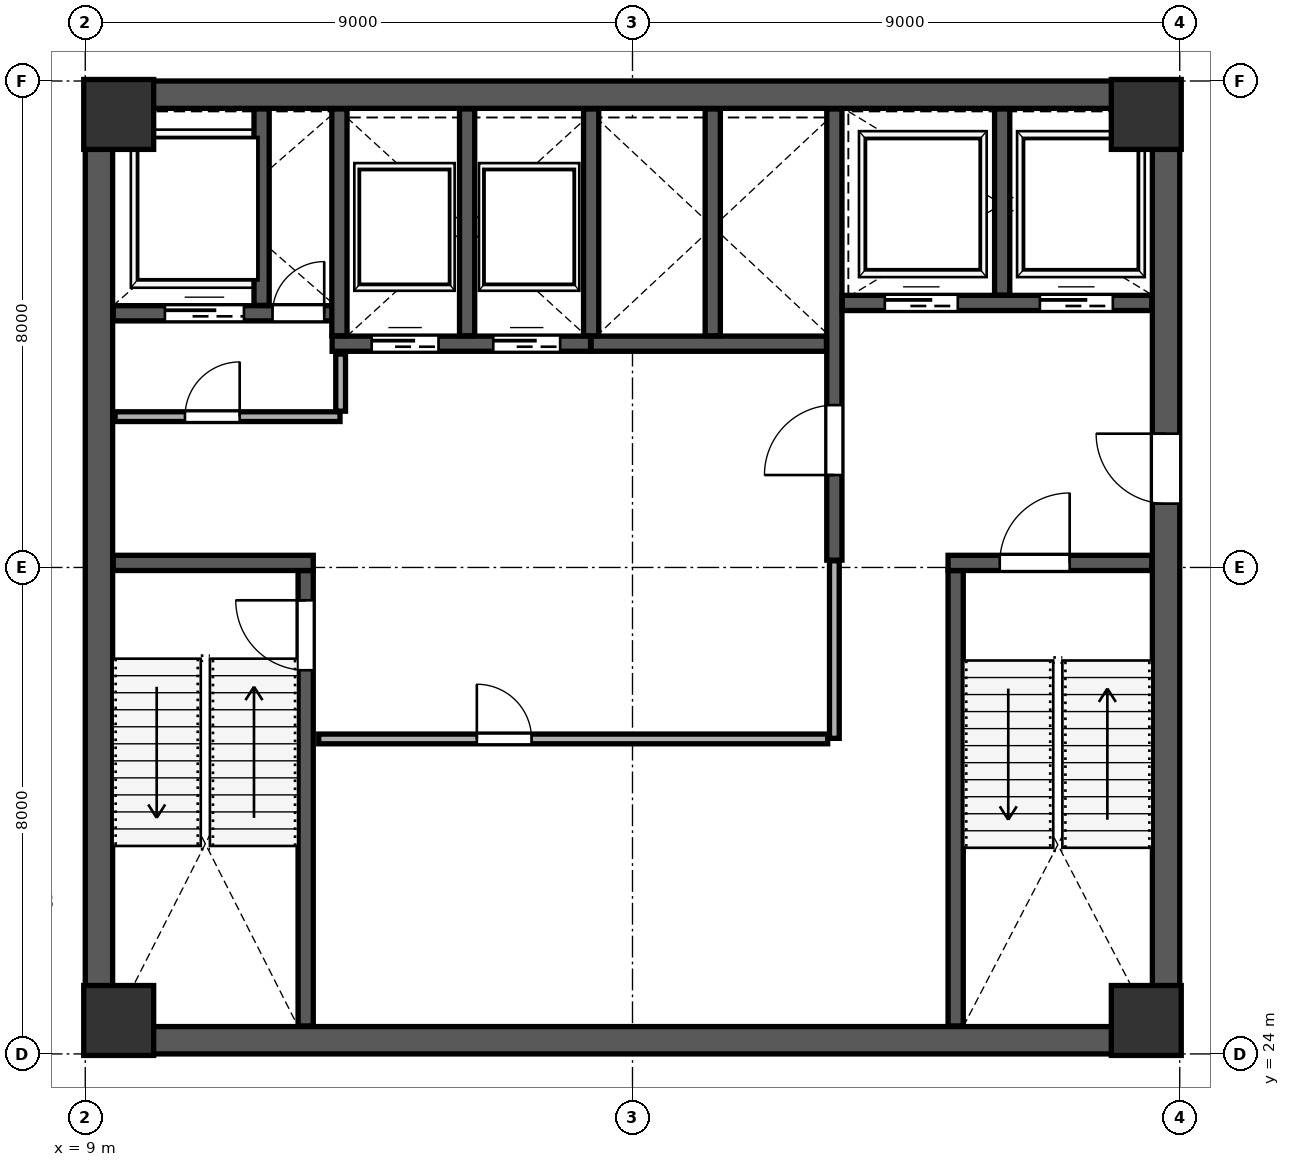
"""IFC4 building model, lengths in metres.
Left out: names, types, materials, properties, quantities, classifications, styles, units other than length and angle.
Written with IfcOpenShell. Run it as: python <this file> out.ifc"""

import sys

from ifc_helpers import new_model, si_unit, direction, frame, frame_2d, origin, origin_2d, place, context, subcontext, project, spatial, rectangle, extrude, source, transform, mapped, element, fill, save


model = new_model("IFC4")
c1 = context("Model", 3, precision=1e-05, world=origin(), true_north=direction((0.0, 1.0)))
c2 = subcontext(c1, "Body", "Model", "MODEL_VIEW")
j1 = project(units=[si_unit("LENGTHUNIT", "METRE"), si_unit("PLANEANGLEUNIT", "RADIAN")], contexts=[c1])
p1 = place(None, origin())
s1 = spatial("IfcSite", under=j1, at=p1, CompositionType="ELEMENT")
p2 = place(p1, origin())
s2 = spatial("IfcBuilding", under=s1, at=p2, CompositionType="ELEMENT")
p3 = place(p2, frame((0.0, 0.0, 196.0)))
s3 = spatial("IfcBuildingStorey", under=s2, at=p3, CompositionType="ELEMENT", Elevation=196.0)
m1 = source(origin(), c2, "Body", "SweptSolid", [
    extrude(rectangle(XDim=1.15, YDim=1.15, at=origin_2d()), origin(), (0.0, 0.0, 1.0), 4.198),
])
for number, where, z_axis, x_axis in (
    (1, (9.55, 24.55, 0.001), (0.0, 0.0, 1.0), (1.0, 0.0, 0.0)),
    (2, (26.45, 24.55, 0.001), (0.0, 0.0, 1.0), (1.0, 0.0, 0.0)),
    (3, (9.55, 39.45, 0.001), (0.0, 0.0, 1.0), (1.0, 0.0, 0.0)),
    (4, (26.45, 39.45, 0.001), (0.0, 0.0, 1.0), (1.0, 0.0, 0.0)),
):
    element("IfcColumn", number, at=place(p3, frame(where, z_axis=z_axis, x_axis=x_axis)), inside=s3, PredefinedType="COLUMN", context=c2, shape_type="MappedRepresentation", body=[
        mapped(m1, transform((0.0, 0.0, 0.0), scale=1.0)),
    ])
p4 = place(p3, frame((9.225, 24.45, 0.0), z_axis=(0.0, 0.0, 1.0), x_axis=(0.0, 1.0, 0.0)))
e5 = element("IfcWall", 5, at=p4, inside=s3, PredefinedType="SHEAR", context=c2, shape_type="SweptSolid", body=[
    extrude(rectangle(XDim=15.1, YDim=0.45, at=frame_2d((7.55, 0.0))), origin(), (0.0, 0.0, 1.0), 3.96),
])
p5 = place(p3, frame((26.775, 24.45, 0.0), z_axis=(0.0, 0.0, 1.0), x_axis=(0.0, 1.0, 0.0)))
e6 = element("IfcWall", 6, at=p5, inside=s3, PredefinedType="SHEAR", context=c2, shape_type="SweptSolid", body=[
    extrude(rectangle(XDim=15.1, YDim=0.45, at=frame_2d((7.55, 0.0))), origin(), (0.0, 0.0, 1.0), 3.96),
])
p6 = place(p5, frame((8.6, 0.0, 0.0)))
e7 = element("IfcOpeningElement", 7, at=p6, cuts=e6, PredefinedType="OPENING", context=c2, shape_type="SweptSolid", body=[
    extrude(rectangle(XDim=1.15, YDim=2.2, at=frame_2d((0.575, 1.1))), frame((0.0, 0.235, 0.0), z_axis=(0.0, -1.0, 0.0), x_axis=(1.0, 0.0, 0.0)), (0.0, 0.0, 1.0), 0.47),
])
for number, where, z_axis, x_axis in (
    (8, (9.0, 24.225, 0.0), (0.0, 0.0, 1.0), (1.0, 0.0, 0.0)),
    (9, (9.0, 39.775, 0.0), (0.0, 0.0, 1.0), (1.0, 0.0, 0.0)),
):
    element("IfcWall", number, at=place(p3, frame(where, z_axis=z_axis, x_axis=x_axis)), inside=s3, PredefinedType="SHEAR", context=c2, shape_type="SweptSolid", body=[
        extrude(rectangle(XDim=18.0, YDim=0.45, at=frame_2d((9.0, 0.0))), origin(), (0.0, 0.0, 1.0), 3.96),
    ])
p7 = place(p3, frame((12.625, 24.46, 0.0), z_axis=(0.0, 0.0, 1.0), x_axis=(0.0, 1.0, 0.0)))
e10 = element("IfcWall", 10, at=p7, inside=s3, PredefinedType="SHEAR", context=c2, shape_type="SweptSolid", body=[
    extrude(rectangle(XDim=7.49, YDim=0.25, at=frame_2d((3.745, 0.0))), origin(), (0.0, 0.0, 1.0), 3.96),
])
p8 = place(p7, frame((5.85, 0.0, 0.0)))
e11 = element("IfcOpeningElement", 11, at=p8, cuts=e10, PredefinedType="OPENING", context=c2, shape_type="SweptSolid", body=[
    extrude(rectangle(XDim=1.15, YDim=2.2, at=frame_2d((0.575, 1.1))), frame((0.0, 0.135, 0.0), z_axis=(0.0, -1.0, 0.0), x_axis=(1.0, 0.0, 0.0)), (0.0, 0.0, 1.0), 0.27),
])
p9 = place(p3, frame((9.46, 32.075, 0.0), z_axis=(0.0, 0.0, 1.0), x_axis=(1.0, 0.0, 0.0)))
e12 = element("IfcWall", 12, at=p9, inside=s3, PredefinedType="SHEAR", context=c2, shape_type="SweptSolid", body=[
    extrude(rectangle(XDim=3.29, YDim=0.25, at=frame_2d((1.645, 0.0))), origin(), (0.0, 0.0, 1.0), 3.96),
])
p10 = place(p3, frame((23.315, 24.46, 0.0), z_axis=(0.0, 0.0, 1.0), x_axis=(0.0, 1.0, 0.0)))
e13 = element("IfcWall", 13, at=p10, inside=s3, PredefinedType="SHEAR", context=c2, shape_type="SweptSolid", body=[
    extrude(rectangle(XDim=7.49, YDim=0.25, at=frame_2d((3.745, 0.0))), origin(), (0.0, 0.0, 1.0), 3.96),
])
p11 = place(p3, frame((23.19, 32.075, 0.0), z_axis=(0.0, 0.0, 1.0), x_axis=(1.0, 0.0, 0.0)))
e14 = element("IfcWall", 14, at=p11, inside=s3, PredefinedType="SHEAR", context=c2, shape_type="SweptSolid", body=[
    extrude(rectangle(XDim=3.35, YDim=0.25, at=frame_2d((1.675, 0.0))), origin(), (0.0, 0.0, 1.0), 3.96),
])
p12 = place(p11, frame((0.85, 0.0, 0.0)))
e15 = element("IfcOpeningElement", 15, at=p12, cuts=e14, PredefinedType="OPENING", context=c2, shape_type="SweptSolid", body=[
    extrude(rectangle(XDim=1.15, YDim=2.2, at=frame_2d((0.575, 1.1))), frame((0.0, 0.135, 0.0), z_axis=(0.0, -1.0, 0.0), x_axis=(1.0, 0.0, 0.0)), (0.0, 0.0, 1.0), 0.27),
])
p13 = place(p3, frame((21.32, 32.12, 0.0), z_axis=(0.0, 0.0, 1.0), x_axis=(0.0, 1.0, 0.0)))
e16 = element("IfcWall", 16, at=p13, inside=s3, PredefinedType="SHEAR", context=c2, shape_type="SweptSolid", body=[
    extrude(rectangle(XDim=7.42, YDim=0.25, at=frame_2d((3.71, 0.0))), origin(), (0.0, 0.0, 1.0), 3.96),
])
p14 = place(p13, frame((1.4, 0.0, 0.0)))
e17 = element("IfcOpeningElement", 17, at=p14, cuts=e16, PredefinedType="OPENING", context=c2, shape_type="SweptSolid", body=[
    extrude(rectangle(XDim=1.15, YDim=2.2, at=frame_2d((0.575, 1.1))), frame((0.0, 0.135, 0.0), z_axis=(0.0, -1.0, 0.0), x_axis=(1.0, 0.0, 0.0)), (0.0, 0.0, 1.0), 0.27),
])
p15 = place(p3, frame((9.46, 36.18, 0.0), z_axis=(0.0, 0.0, 1.0), x_axis=(1.0, 0.0, 0.0)))
e18 = element("IfcWall", 18, at=p15, inside=s3, PredefinedType="SHEAR", context=c2, shape_type="SweptSolid", body=[
    extrude(rectangle(XDim=3.79, YDim=0.25, at=frame_2d((1.895, 0.0))), origin(), (0.0, 0.0, 1.0), 3.96),
])
p16 = place(p15, frame((2.62, 0.0, 0.0)))
e19 = element("IfcOpeningElement", 19, at=p16, cuts=e18, PredefinedType="OPENING", context=c2, shape_type="SweptSolid", body=[
    extrude(rectangle(XDim=0.85, YDim=2.1, at=frame_2d((0.425, 1.05))), frame((0.0, 0.135, 0.0), z_axis=(0.0, -1.0, 0.0), x_axis=(1.0, 0.0, 0.0)), (0.0, 0.0, 1.0), 0.27),
])
p17 = place(p15, frame((0.85, 0.0, 0.0)))
e20 = element("IfcOpeningElement", 20, at=p17, cuts=e18, PredefinedType="OPENING", context=c2, shape_type="SweptSolid", body=[
    extrude(rectangle(XDim=1.3, YDim=2.25, at=frame_2d((0.65, 1.125))), frame((0.0, 0.135, 0.0), z_axis=(0.0, -1.0, 0.0), x_axis=(1.0, 0.0, 0.0)), (0.0, 0.0, 1.0), 0.27),
])
p18 = place(p3, frame((11.9, 36.31, 0.0), z_axis=(0.0, 0.0, 1.0), x_axis=(0.0, 1.0, 0.0)))
e21 = element("IfcWall", 21, at=p18, inside=s3, PredefinedType="SHEAR", context=c2, shape_type="SweptSolid", body=[
    extrude(rectangle(XDim=3.23, YDim=0.25, at=frame_2d((1.615, 0.0))), origin(), (0.0, 0.0, 1.0), 3.96),
])
p19 = place(p3, frame((21.45, 36.35, 0.0), z_axis=(0.0, 0.0, 1.0), x_axis=(1.0, 0.0, 0.0)))
e22 = element("IfcWall", 22, at=p19, inside=s3, PredefinedType="SHEAR", context=c2, shape_type="SweptSolid", body=[
    extrude(rectangle(XDim=5.09, YDim=0.25, at=frame_2d((2.545, 0.0))), origin(), (0.0, 0.0, 1.0), 3.96),
])
p20 = place(p19, frame((0.7, 0.0, 0.0)))
e23 = element("IfcOpeningElement", 23, at=p20, cuts=e22, PredefinedType="OPENING", context=c2, shape_type="SweptSolid", body=[
    extrude(rectangle(XDim=1.2, YDim=2.2, at=frame_2d((0.6, 1.1))), frame((0.0, 0.135, 0.0), z_axis=(0.0, -1.0, 0.0), x_axis=(1.0, 0.0, 0.0)), (0.0, 0.0, 1.0), 0.27),
])
p21 = place(p19, frame((3.25, 0.0, 0.0)))
e24 = element("IfcOpeningElement", 24, at=p21, cuts=e22, PredefinedType="OPENING", context=c2, shape_type="SweptSolid", body=[
    extrude(rectangle(XDim=1.2, YDim=2.2, at=frame_2d((0.6, 1.1))), frame((0.0, 0.135, 0.0), z_axis=(0.0, -1.0, 0.0), x_axis=(1.0, 0.0, 0.0)), (0.0, 0.0, 1.0), 0.27),
])
p22 = place(p3, frame((24.08, 36.48, 0.0), z_axis=(0.0, 0.0, 1.0), x_axis=(0.0, 1.0, 0.0)))
e25 = element("IfcWall", 25, at=p22, inside=s3, PredefinedType="SHEAR", context=c2, shape_type="SweptSolid", body=[
    extrude(rectangle(XDim=3.06, YDim=0.25, at=frame_2d((1.53, 0.0))), origin(), (0.0, 0.0, 1.0), 3.96),
])
p23 = place(p3, frame((13.06, 35.68, 0.0), z_axis=(0.0, 0.0, 1.0), x_axis=(1.0, 0.0, 0.0)))
e26 = element("IfcWall", 26, at=p23, inside=s3, PredefinedType="SHEAR", context=c2, shape_type="SweptSolid", body=[
    extrude(rectangle(XDim=4.25, YDim=0.25, at=frame_2d((2.125, 0.0))), origin(), (0.0, 0.0, 1.0), 3.96),
])
p24 = place(p23, frame((0.65, 0.0, 0.0)))
e27 = element("IfcOpeningElement", 27, at=p24, cuts=e26, PredefinedType="OPENING", context=c2, shape_type="SweptSolid", body=[
    extrude(rectangle(XDim=1.1, YDim=2.2, at=frame_2d((0.55, 1.1))), frame((0.0, 0.135, 0.0), z_axis=(0.0, -1.0, 0.0), x_axis=(1.0, 0.0, 0.0)), (0.0, 0.0, 1.0), 0.27),
])
p25 = place(p23, frame((2.65, 0.0, 0.0)))
e28 = element("IfcOpeningElement", 28, at=p25, cuts=e26, PredefinedType="OPENING", context=c2, shape_type="SweptSolid", body=[
    extrude(rectangle(XDim=1.1, YDim=2.2, at=frame_2d((0.55, 1.1))), frame((0.0, 0.135, 0.0), z_axis=(0.0, -1.0, 0.0), x_axis=(1.0, 0.0, 0.0)), (0.0, 0.0, 1.0), 0.27),
])
for number, where, z_axis, x_axis in (
    (29, (13.18, 35.81, 0.0), (0.0, 0.0, 1.0), (0.0, 1.0, 0.0)),
    (30, (15.28, 35.81, 0.0), (0.0, 0.0, 1.0), (0.0, 1.0, 0.0)),
):
    element("IfcWall", number, at=place(p3, frame(where, z_axis=z_axis, x_axis=x_axis)), inside=s3, PredefinedType="SHEAR", context=c2, shape_type="SweptSolid", body=[
        extrude(rectangle(XDim=3.73, YDim=0.25, at=frame_2d((1.865, 0.0))), origin(), (0.0, 0.0, 1.0), 3.96),
    ])
p26 = place(p3, frame((17.32, 35.68, 0.0), z_axis=(0.0, 0.0, 1.0), x_axis=(1.0, 0.0, 0.0)))
e31 = element("IfcWall", 31, at=p26, inside=s3, PredefinedType="SHEAR", context=c2, shape_type="SweptSolid", body=[
    extrude(rectangle(XDim=3.87, YDim=0.25, at=frame_2d((1.935, 0.0))), origin(), (0.0, 0.0, 1.0), 3.96),
])
for number, where, z_axis, x_axis in (
    (32, (17.32, 35.81, 0.0), (0.0, 0.0, 1.0), (0.0, 1.0, 0.0)),
    (33, (19.32, 35.81, 0.0), (0.0, 0.0, 1.0), (0.0, 1.0, 0.0)),
):
    element("IfcWall", number, at=place(p3, frame(where, z_axis=z_axis, x_axis=x_axis)), inside=s3, PredefinedType="SHEAR", context=c2, shape_type="SweptSolid", body=[
        extrude(rectangle(XDim=3.73, YDim=0.25, at=frame_2d((1.865, 0.0))), origin(), (0.0, 0.0, 1.0), 3.96),
    ])
p27 = place(p3, frame((9.49, 34.48, 0.0), z_axis=(0.0, 0.0, 1.0), x_axis=(1.0, 0.0, 0.0)))
e34 = element("IfcWall", 34, at=p27, inside=s3, PredefinedType="PARTITIONING", context=c2, shape_type="SweptSolid", body=[
    extrude(rectangle(XDim=3.7, YDim=0.16, at=frame_2d((1.85, 0.0))), origin(), (0.0, 0.0, 1.0), 3.96),
])
p28 = place(p27, frame((1.15, 0.0, 0.0)))
e35 = element("IfcOpeningElement", 35, at=p28, cuts=e34, PredefinedType="OPENING", context=c2, shape_type="SweptSolid", body=[
    extrude(rectangle(XDim=0.9, YDim=2.15, at=frame_2d((0.45, 1.075))), frame((0.0, 0.09, 0.0), z_axis=(0.0, -1.0, 0.0), x_axis=(1.0, 0.0, 0.0)), (0.0, 0.0, 1.0), 0.18),
])
p29 = place(p3, frame((13.2, 34.57, 0.0), z_axis=(0.0, 0.0, 1.0), x_axis=(0.0, 1.0, 0.0)))
e36 = element("IfcWall", 36, at=p29, inside=s3, PredefinedType="PARTITIONING", context=c2, shape_type="SweptSolid", body=[
    extrude(rectangle(XDim=0.94, YDim=0.16, at=frame_2d((0.47, 0.0))), origin(), (0.0, 0.0, 1.0), 3.96),
])
p30 = place(p3, frame((12.84, 29.18, 0.0), z_axis=(0.0, 0.0, 1.0), x_axis=(1.0, 0.0, 0.0)))
e37 = element("IfcWall", 37, at=p30, inside=s3, PredefinedType="PARTITIONING", context=c2, shape_type="SweptSolid", body=[
    extrude(rectangle(XDim=8.37, YDim=0.16, at=frame_2d((4.185, 0.0))), origin(), (0.0, 0.0, 1.0), 3.96),
])
p31 = place(p30, frame((2.6, 0.0, 0.0)))
e38 = element("IfcOpeningElement", 38, at=p31, cuts=e37, PredefinedType="OPENING", context=c2, shape_type="SweptSolid", body=[
    extrude(rectangle(XDim=0.9, YDim=2.15, at=frame_2d((0.45, 1.075))), frame((0.0, 0.09, 0.0), z_axis=(0.0, -1.0, 0.0), x_axis=(1.0, 0.0, 0.0)), (0.0, 0.0, 1.0), 0.18),
])
p32 = place(p3, frame((21.32, 29.19, 0.0), z_axis=(0.0, 0.0, 1.0), x_axis=(0.0, 1.0, 0.0)))
e39 = element("IfcWall", 39, at=p32, inside=s3, PredefinedType="PARTITIONING", context=c2, shape_type="SweptSolid", body=[
    extrude(rectangle(XDim=2.92, YDim=0.16, at=frame_2d((1.46, 0.0))), origin(), (0.0, 0.0, 1.0), 3.96),
])
p33 = place(p3, frame((14.821, 50.374, 0.0), z_axis=(0.0, 0.0, 1.0), x_axis=(0.819153719849, -0.573574043396, 0.0)))
e40 = element("IfcWall", 40, at=p33, inside=s3, PredefinedType="PARTITIONING", context=c2, shape_type="SweptSolid", body=[
    extrude(rectangle(XDim=26.99, YDim=0.115, at=frame_2d((13.495, 0.0))), origin(), (0.0, 0.0, 1.0), 3.96),
])
p34 = place(p33, frame((18.8, 0.0, 0.0)))
e41 = element("IfcOpeningElement", 41, at=p34, cuts=e40, PredefinedType="OPENING", context=c2, shape_type="SweptSolid", body=[
    extrude(rectangle(XDim=0.95, YDim=2.15, at=frame_2d((0.475, 1.075))), frame((0.0, 0.067, 0.0), z_axis=(0.0, -1.0, 0.0), x_axis=(1.0, 0.0, 0.0)), (0.0, 0.0, 1.0), 0.135),
])
p35 = place(p3, frame((1.189, 30.975, 0.0), z_axis=(0.0, 0.0, 1.0), x_axis=(0.573571020786, 0.819155836282, 0.0)))
e42 = element("IfcWall", 42, at=p35, inside=s3, PredefinedType="PARTITIONING", context=c2, shape_type="SweptSolid", body=[
    extrude(rectangle(XDim=23.67, YDim=0.135, at=frame_2d((11.835, 0.0))), origin(), (0.0, 0.0, 1.0), 3.96),
])
p36 = place(p35, frame((6.6, 0.0, 0.0)))
e43 = element("IfcOpeningElement", 43, at=p36, cuts=e42, PredefinedType="OPENING", context=c2, shape_type="SweptSolid", body=[
    extrude(rectangle(XDim=0.95, YDim=2.15, at=frame_2d((0.475, 1.075))), frame((0.0, 0.078, 0.0), z_axis=(0.0, -1.0, 0.0), x_axis=(1.0, 0.0, 0.0)), (0.0, 0.0, 1.0), 0.155),
])
m2 = source(origin(), c2, "Body", "SweptSolid", [
    extrude(rectangle(XDim=1.15, YDim=2.2, at=frame_2d((0.575, 1.1))), frame((0.0, 0.025, 0.0), z_axis=(0.0, -1.0, 0.0), x_axis=(1.0, 0.0, 0.0)), (0.0, 0.0, 1.0), 0.05),
])
p37 = place(p8, origin())
e44 = element("IfcDoor", 44, at=p37, inside=s3, OperationType="SINGLE_SWING_RIGHT", PredefinedType="DOOR", context=c2, shape_type="MappedRepresentation", body=[
    mapped(m2, transform((0.0, 0.0, 0.0), scale=1.0)),
])
fill(e11, e44)
m3 = source(origin(), c2, "Body", "SweptSolid", [
    extrude(rectangle(XDim=1.15, YDim=2.2, at=frame_2d((0.575, 1.1))), frame((0.0, 0.025, 0.0), z_axis=(0.0, -1.0, 0.0), x_axis=(1.0, 0.0, 0.0)), (0.0, 0.0, 1.0), 0.05),
])
p38 = place(p14, origin())
e45 = element("IfcDoor", 45, at=p38, inside=s3, OperationType="SINGLE_SWING_LEFT", PredefinedType="DOOR", context=c2, shape_type="MappedRepresentation", body=[
    mapped(m3, transform((0.0, 0.0, 0.0), scale=1.0)),
])
fill(e17, e45)
p39 = place(p12, origin())
e46 = element("IfcDoor", 46, at=p39, inside=s3, OperationType="SINGLE_SWING_RIGHT", PredefinedType="DOOR", context=c2, shape_type="MappedRepresentation", body=[
    mapped(m2, transform((0.0, 0.0, 0.0), scale=1.0)),
])
fill(e15, e46)
p40 = place(p6, origin())
e47 = element("IfcDoor", 47, at=p40, inside=s3, OperationType="SINGLE_SWING_RIGHT", PredefinedType="DOOR", context=c2, shape_type="MappedRepresentation", body=[
    mapped(m3, transform((0.0, 0.0, 0.0), scale=1.0)),
])
fill(e7, e47)
m4 = source(origin(), c2, "Body", "SweptSolid", [
    extrude(rectangle(XDim=0.85, YDim=2.1, at=frame_2d((0.425, 1.05))), frame((0.0, 0.025, 0.0), z_axis=(0.0, -1.0, 0.0), x_axis=(1.0, 0.0, 0.0)), (0.0, 0.0, 1.0), 0.05),
])
p41 = place(p16, origin())
e48 = element("IfcDoor", 48, at=p41, inside=s3, OperationType="SINGLE_SWING_RIGHT", PredefinedType="DOOR", context=c2, shape_type="MappedRepresentation", body=[
    mapped(m4, transform((0.0, 0.0, 0.0), scale=1.0)),
])
fill(e19, e48)
m5 = source(origin(), c2, "Body", "SweptSolid", [
    extrude(rectangle(XDim=1.1, YDim=2.2, at=frame_2d((0.55, 1.1))), frame((0.0, 0.025, 0.0), z_axis=(0.0, -1.0, 0.0), x_axis=(1.0, 0.0, 0.0)), (0.0, 0.0, 1.0), 0.05),
])
p42 = place(p24, origin())
e49 = element("IfcDoor", 49, at=p42, inside=s3, OperationType="SLIDING_TO_LEFT", PredefinedType="DOOR", context=c2, shape_type="MappedRepresentation", body=[
    mapped(m5, transform((0.0, 0.0, 0.0), scale=1.0)),
])
fill(e27, e49)
p43 = place(p25, origin())
e50 = element("IfcDoor", 50, at=p43, inside=s3, OperationType="SLIDING_TO_RIGHT", PredefinedType="DOOR", context=c2, shape_type="MappedRepresentation", body=[
    mapped(m5, transform((0.0, 0.0, 0.0), scale=1.0)),
])
fill(e28, e50)
m6 = source(origin(), c2, "Body", "SweptSolid", [
    extrude(rectangle(XDim=1.2, YDim=2.2, at=frame_2d((0.6, 1.1))), frame((0.0, 0.025, 0.0), z_axis=(0.0, -1.0, 0.0), x_axis=(1.0, 0.0, 0.0)), (0.0, 0.0, 1.0), 0.05),
])
p44 = place(p20, origin())
e51 = element("IfcDoor", 51, at=p44, inside=s3, OperationType="SLIDING_TO_LEFT", PredefinedType="DOOR", context=c2, shape_type="MappedRepresentation", body=[
    mapped(m6, transform((0.0, 0.0, 0.0), scale=1.0)),
])
fill(e23, e51)
p45 = place(p21, origin())
e52 = element("IfcDoor", 52, at=p45, inside=s3, OperationType="SLIDING_TO_RIGHT", PredefinedType="DOOR", context=c2, shape_type="MappedRepresentation", body=[
    mapped(m6, transform((0.0, 0.0, 0.0), scale=1.0)),
])
fill(e24, e52)
m7 = source(origin(), c2, "Body", "SweptSolid", [
    extrude(rectangle(XDim=1.3, YDim=2.25, at=frame_2d((0.65, 1.125))), frame((0.0, 0.025, 0.0), z_axis=(0.0, -1.0, 0.0), x_axis=(1.0, 0.0, 0.0)), (0.0, 0.0, 1.0), 0.05),
])
p46 = place(p17, origin())
e53 = element("IfcDoor", 53, at=p46, inside=s3, OperationType="SLIDING_TO_LEFT", PredefinedType="DOOR", context=c2, shape_type="MappedRepresentation", body=[
    mapped(m7, transform((0.0, 0.0, 0.0), scale=1.0)),
])
fill(e20, e53)
m8 = source(origin(), c2, "Body", "SweptSolid", [
    extrude(rectangle(XDim=0.9, YDim=2.15, at=frame_2d((0.45, 1.075))), frame((0.0, 0.025, 0.0), z_axis=(0.0, -1.0, 0.0), x_axis=(1.0, 0.0, 0.0)), (0.0, 0.0, 1.0), 0.05),
])
p47 = place(p28, origin())
e54 = element("IfcDoor", 54, at=p47, inside=s3, OperationType="SINGLE_SWING_RIGHT", PredefinedType="DOOR", context=c2, shape_type="MappedRepresentation", body=[
    mapped(m8, transform((0.0, 0.0, 0.0), scale=1.0)),
])
fill(e35, e54)
p48 = place(p31, origin())
e55 = element("IfcDoor", 55, at=p48, inside=s3, OperationType="SINGLE_SWING_LEFT", PredefinedType="DOOR", context=c2, shape_type="MappedRepresentation", body=[
    mapped(m8, transform((0.0, 0.0, 0.0), scale=1.0)),
])
fill(e38, e55)
save(model, sys.argv[1])
